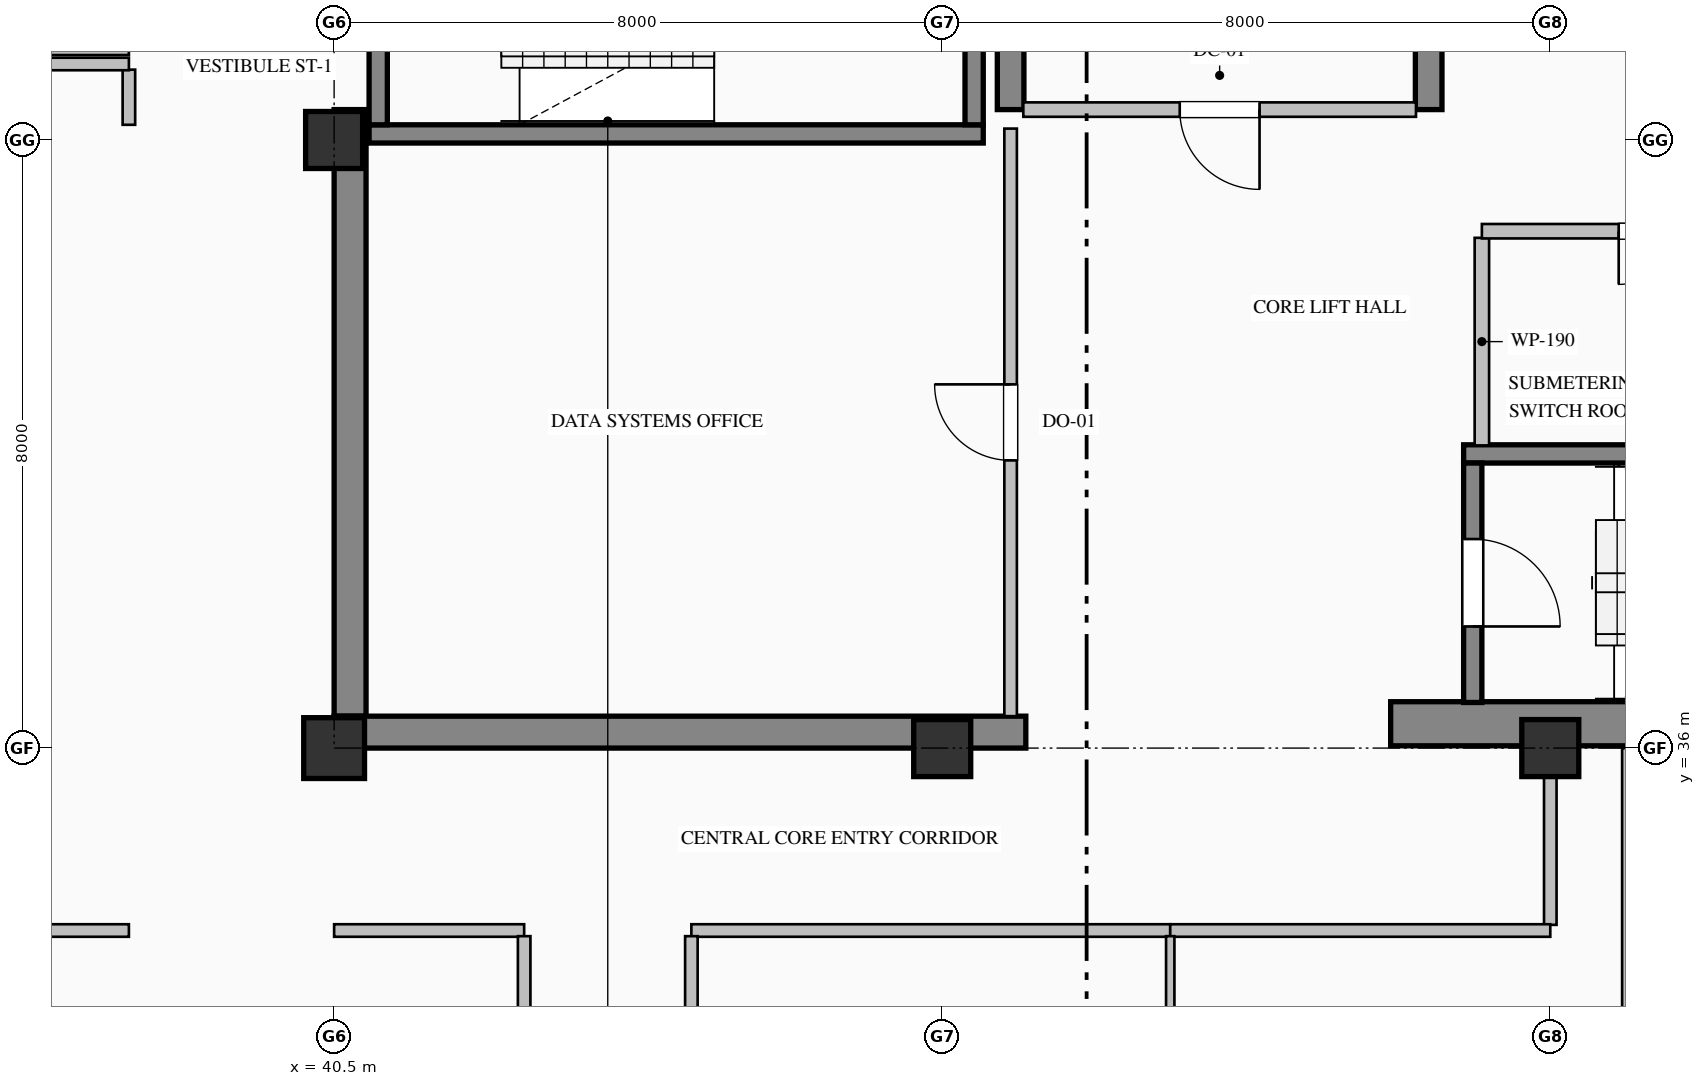
"""IFC4 building model, lengths in metres.
Left out: names, types, materials, properties, quantities, classifications, styles, units other than length and angle.
Written with IfcOpenShell. Run it as: python <this file> out.ifc"""

import sys

from ifc_helpers import new_model, si_unit, direction, frame, frame_2d, origin, origin_2d, place, context, subcontext, project, spatial, rectangle, hollow_rectangle, extrude, element, fill, save


model = new_model("IFC4")
c1 = context("Model", 3, precision=1e-05, world=origin(), true_north=direction((0.0, 1.0)))
c2 = subcontext(c1, "Body", "Model", "MODEL_VIEW")
j1 = project(units=[si_unit("LENGTHUNIT", "METRE"), si_unit("PLANEANGLEUNIT", "RADIAN")], contexts=[c1])
p1 = place(None, origin())
s1 = spatial("IfcSite", under=j1, at=p1, CompositionType="ELEMENT")
p2 = place(p1, origin())
s2 = spatial("IfcBuilding", under=s1, at=p2, CompositionType="ELEMENT")
p3 = place(p2, frame((0.0, 0.0, 327.2)))
s3 = spatial("IfcBuildingStorey", under=s2, at=p3, CompositionType="ELEMENT", Elevation=327.2)
p4 = place(p3, frame((40.71, 36.42, 0.0), z_axis=(0.0, 0.0, 1.0), x_axis=(0.0, 1.0, 0.0)))
e1 = element("IfcWall", 1, at=p4, inside=s3, PredefinedType="SHEAR", context=c2, shape_type="SweptSolid", body=[
    extrude(rectangle(XDim=7.98, YDim=0.42, at=frame_2d((3.99, 0.0))), origin(), (0.0, 0.0, 1.0), 3.785),
])
p5 = place(p3, frame((40.5, 36.21, 0.0), z_axis=(0.0, 0.0, 1.0), x_axis=(1.0, 0.0, 0.0)))
e2 = element("IfcWall", 2, at=p5, inside=s3, PredefinedType="SHEAR", context=c2, shape_type="SweptSolid", body=[
    extrude(rectangle(XDim=9.1, YDim=0.42, at=frame_2d((4.55, 0.0))), origin(), (0.0, 0.0, 1.0), 3.785),
])
p6 = place(p3, frame((54.4, 36.32, 0.0), z_axis=(0.0, 0.0, 1.0), x_axis=(1.0, 0.0, 0.0)))
e3 = element("IfcWall", 3, at=p6, inside=s3, PredefinedType="SHEAR", context=c2, shape_type="SweptSolid", body=[
    extrude(rectangle(XDim=9.6, YDim=0.58, at=frame_2d((4.8, 0.0))), origin(), (0.0, 0.0, 1.0), 4.0),
])
p7 = place(p3, frame((49.4, 44.4, 0.0), z_axis=(0.0, 0.0, 1.0), x_axis=(0.0, 1.0, 0.0)))
e4 = element("IfcWall", 4, at=p7, inside=s3, PredefinedType="SHEAR", context=c2, shape_type="SweptSolid", body=[
    extrude(rectangle(XDim=3.0, YDim=0.35, at=frame_2d((1.5, 0.0))), origin(), (0.0, 0.0, 1.0), 3.785),
])
p8 = place(p3, frame((54.9, 44.4, 0.0), z_axis=(0.0, 0.0, 1.0), x_axis=(0.0, 1.0, 0.0)))
e5 = element("IfcWall", 5, at=p8, inside=s3, PredefinedType="SHEAR", context=c2, shape_type="SweptSolid", body=[
    extrude(rectangle(XDim=7.18, YDim=0.35, at=frame_2d((3.59, 0.0))), origin(), (0.0, 0.0, 1.0), 3.785),
])
p9 = place(p3, frame((40.5, 36.0, 0.0), z_axis=(0.0, 0.0, 1.0), x_axis=(1.0, 0.0, 0.0)))
e6 = element("IfcColumn", 6, at=p9, inside=s3, PredefinedType="COLUMN", context=c2, shape_type="SweptSolid", body=[
    extrude(hollow_rectangle(XDim=0.8, YDim=0.8, WallThickness=0.032, at=origin_2d()), origin(), (0.0, 0.0, 1.0), 4.0),
])
for number, where, z_axis, x_axis in (
    (7, (40.5, 44.0, 0.0), (0.0, 0.0, 1.0), (1.0, 0.0, 0.0)),
    (8, (48.5, 36.0, 0.0), (0.0, 0.0, 1.0), (1.0, 0.0, 0.0)),
    (9, (56.5, 36.0, 0.0), (0.0, 0.0, 1.0), (1.0, 0.0, 0.0)),
):
    element("IfcColumn", number, at=place(p3, frame(where, z_axis=z_axis, x_axis=x_axis)), inside=s3, PredefinedType="COLUMN", context=c2, shape_type="SweptSolid", body=[
        extrude(rectangle(XDim=0.75, YDim=0.75, at=origin_2d()), origin(), (0.0, 0.0, 1.0), 4.0),
    ])
p10 = place(p3, frame((49.04, 44.08, 0.0), z_axis=(0.0, 0.0, 1.0), x_axis=(-1.0, 0.0, 0.0)))
e10 = element("IfcWall", 10, at=p10, inside=s3, PredefinedType="SOLIDWALL", context=c2, shape_type="SweptSolid", body=[
    extrude(rectangle(XDim=8.08, YDim=0.24, at=frame_2d((4.04, 0.0))), origin(), (0.0, 0.0, 1.0), 4.0),
])
p11 = place(p3, frame((41.08, 47.35, 0.0), z_axis=(0.0, 0.0, 1.0), x_axis=(0.0, -1.0, 0.0)))
e11 = element("IfcWall", 11, at=p11, inside=s3, PredefinedType="SOLIDWALL", context=c2, shape_type="SweptSolid", body=[
    extrude(rectangle(XDim=3.15, YDim=0.24, at=frame_2d((1.575, 0.0))), origin(), (0.0, 0.0, 1.0), 4.0),
])
p12 = place(p11, frame((1.0, 0.0, 0.0)))
e12 = element("IfcOpeningElement", 12, at=p12, cuts=e11, PredefinedType="OPENING", context=c2, shape_type="SweptSolid", body=[
    extrude(rectangle(XDim=1.15, YDim=2.2, at=frame_2d((0.575, 1.1))), frame((0.0, 0.13, 0.0), z_axis=(0.0, -1.0, 0.0), x_axis=(1.0, 0.0, 0.0)), (0.0, 0.0, 1.0), 0.26),
])
p13 = place(p3, frame((48.92, 44.2, 0.0), z_axis=(0.0, 0.0, 1.0), x_axis=(0.0, 1.0, 0.0)))
e13 = element("IfcWall", 13, at=p13, inside=s3, PredefinedType="SOLIDWALL", context=c2, shape_type="SweptSolid", body=[
    extrude(rectangle(XDim=3.15, YDim=0.24, at=frame_2d((1.575, 0.0))), origin(), (0.0, 0.0, 1.0), 4.0),
])
p14 = place(p3, frame((55.36, 39.87, 0.0), z_axis=(0.0, 0.0, 1.0), x_axis=(1.0, 0.0, 0.0)))
e14 = element("IfcWall", 14, at=p14, inside=s3, PredefinedType="SOLIDWALL", context=c2, shape_type="SweptSolid", body=[
    extrude(rectangle(XDim=8.08, YDim=0.24, at=frame_2d((4.04, 0.0))), origin(), (0.0, 0.0, 1.0), 4.0),
])
p15 = place(p3, frame((55.48, 39.75, 0.0), z_axis=(0.0, 0.0, 1.0), x_axis=(0.0, -1.0, 0.0)))
e15 = element("IfcWall", 15, at=p15, inside=s3, PredefinedType="SOLIDWALL", context=c2, shape_type="SweptSolid", body=[
    extrude(rectangle(XDim=3.15, YDim=0.24, at=frame_2d((1.575, 0.0))), origin(), (0.0, 0.0, 1.0), 4.0),
])
p16 = place(p15, frame((1.0, 0.0, 0.0)))
e16 = element("IfcOpeningElement", 16, at=p16, cuts=e15, PredefinedType="OPENING", context=c2, shape_type="SweptSolid", body=[
    extrude(rectangle(XDim=1.15, YDim=2.2, at=frame_2d((0.575, 1.1))), frame((0.0, 0.13, 0.0), z_axis=(0.0, -1.0, 0.0), x_axis=(1.0, 0.0, 0.0)), (0.0, 0.0, 1.0), 0.26),
])
p17 = place(p3, frame((37.8, 44.2, 0.0), z_axis=(0.0, 0.0, 1.0), x_axis=(0.0, 1.0, 0.0)))
e17 = element("IfcWall", 17, at=p17, inside=s3, PredefinedType="PARTITIONING", context=c2, shape_type="SweptSolid", body=[
    extrude(rectangle(XDim=0.726, YDim=0.165, at=frame_2d((0.363, 0.0))), origin(), (0.0, 0.0, 1.0), 3.785),
])
p18 = place(p3, frame((54.733, 44.4, 0.0), z_axis=(0.0, 0.0, 1.0), x_axis=(-1.0, 0.0, 0.0)))
e18 = element("IfcWall", 18, at=p18, inside=s3, PredefinedType="PARTITIONING", context=c2, shape_type="SweptSolid", body=[
    extrude(rectangle(XDim=5.166, YDim=0.19, at=frame_2d((2.583, 0.0))), origin(), (0.0, 0.0, 1.0), 3.785),
])
p19 = place(p18, frame((2.058, 0.0, 0.0)))
e19 = element("IfcOpeningElement", 19, at=p19, cuts=e18, PredefinedType="OPENING", context=c2, shape_type="SweptSolid", body=[
    extrude(rectangle(XDim=1.05, YDim=2.15, at=frame_2d((0.525, 1.075))), frame((0.0, 0.105, 0.0), z_axis=(0.0, -1.0, 0.0), x_axis=(1.0, 0.0, 0.0)), (0.0, 0.0, 1.0), 0.21),
])
p20 = place(p3, frame((49.4, 36.42, 0.0), z_axis=(0.0, 0.0, 1.0), x_axis=(0.0, 1.0, 0.0)))
e20 = element("IfcWall", 20, at=p20, inside=s3, PredefinedType="PARTITIONING", context=c2, shape_type="SweptSolid", body=[
    extrude(rectangle(XDim=7.73, YDim=0.165, at=frame_2d((3.865, 0.0))), origin(), (0.0, 0.0, 1.0), 3.027),
])
p21 = place(p20, frame((3.365, 0.0, 0.0)))
e21 = element("IfcOpeningElement", 21, at=p21, cuts=e20, PredefinedType="OPENING", context=c2, shape_type="SweptSolid", body=[
    extrude(rectangle(XDim=1.0, YDim=2.15, at=frame_2d((0.5, 1.075))), frame((0.0, 0.093, 0.0), z_axis=(0.0, -1.0, 0.0), x_axis=(1.0, 0.0, 0.0)), (0.0, 0.0, 1.0), 0.185),
])
p22 = place(p3, frame((55.6, 42.713, 0.0), z_axis=(0.0, 0.0, 1.0), x_axis=(0.0, -1.0, 0.0)))
e22 = element("IfcWall", 22, at=p22, inside=s3, PredefinedType="PARTITIONING", context=c2, shape_type="SweptSolid", body=[
    extrude(rectangle(XDim=2.731, YDim=0.19, at=frame_2d((1.365, 0.0))), origin(), (0.0, 0.0, 1.0), 3.785),
])
p23 = place(p3, frame((60.6, 42.8, 0.0), z_axis=(0.0, 0.0, 1.0), x_axis=(-1.0, 0.0, 0.0)))
e23 = element("IfcWall", 23, at=p23, inside=s3, PredefinedType="PARTITIONING", context=c2, shape_type="SweptSolid", body=[
    extrude(rectangle(XDim=5.0, YDim=0.19, at=frame_2d((2.5, 0.0))), origin(), (0.0, 0.0, 1.0), 3.785),
])
p24 = place(p23, frame((1.8, 0.0, 0.0)))
e24 = element("IfcOpeningElement", 24, at=p24, cuts=e23, PredefinedType="OPENING", context=c2, shape_type="SweptSolid", body=[
    extrude(rectangle(XDim=1.4, YDim=2.25, at=frame_2d((0.7, 1.125))), frame((0.0, 0.105, 0.0), z_axis=(0.0, -1.0, 0.0), x_axis=(1.0, 0.0, 0.0)), (0.0, 0.0, 1.0), 0.21),
])
p25 = place(p3, frame((37.8, 45.2, 0.0), z_axis=(0.0, 0.0, 1.0), x_axis=(-1.0, 0.0, 0.0)))
e25 = element("IfcWall", 25, at=p25, inside=s3, PredefinedType="PARTITIONING", context=c2, shape_type="SweptSolid", body=[
    extrude(rectangle(XDim=13.3, YDim=0.165, at=frame_2d((6.65, 0.0))), origin(), (0.0, 0.0, 1.0), 3.785),
])
p26 = place(p25, frame((6.15, 0.0, 0.0)))
e26 = element("IfcOpeningElement", 26, at=p26, cuts=e25, PredefinedType="OPENING", context=c2, shape_type="SweptSolid", body=[
    extrude(rectangle(XDim=1.0, YDim=2.15, at=frame_2d((0.5, 1.075))), frame((0.0, 0.093, 0.0), z_axis=(0.0, -1.0, 0.0), x_axis=(1.0, 0.0, 0.0)), (0.0, 0.0, 1.0), 0.185),
])
for number, where, z_axis, x_axis in (
    (27, (37.8, 33.6, 0.0), (0.0, 0.0, 1.0), (-1.0, 0.0, 0.0)),
    (28, (35.4, 45.0, 0.0), (0.0, 0.0, 1.0), (1.0, 0.0, 0.0)),
):
    element("IfcWall", number, at=place(p3, frame(where, z_axis=z_axis, x_axis=x_axis)), inside=s3, PredefinedType="PARTITIONING", context=c2, shape_type="SweptSolid", body=[
        extrude(rectangle(XDim=2.4, YDim=0.165, at=frame_2d((1.2, 0.0))), origin(), (0.0, 0.0, 1.0), 3.785),
    ])
p27 = place(p3, frame((51.5, 33.6, 0.0), z_axis=(0.0, 0.0, 1.0), x_axis=(-1.0, 0.0, 0.0)))
e29 = element("IfcWall", 29, at=p27, inside=s3, PredefinedType="PARTITIONING", context=c2, shape_type="SweptSolid", body=[
    extrude(rectangle(XDim=6.3, YDim=0.165, at=frame_2d((3.15, 0.0))), origin(), (0.0, 0.0, 1.0), 3.785),
])
p28 = place(p3, frame((56.5, 36.0, 0.0), z_axis=(0.0, 0.0, 1.0), x_axis=(0.0, -1.0, 0.0)))
e30 = element("IfcWall", 30, at=p28, inside=s3, PredefinedType="PARTITIONING", context=c2, shape_type="SweptSolid", body=[
    extrude(rectangle(XDim=2.325, YDim=0.165, at=frame_2d((1.163, 0.0))), origin(), (0.0, 0.0, 1.0), 3.177),
])
p29 = place(p3, frame((56.5, 33.6, 0.0), z_axis=(0.0, 0.0, 1.0), x_axis=(-1.0, 0.0, 0.0)))
e31 = element("IfcWall", 31, at=p29, inside=s3, PredefinedType="PARTITIONING", context=c2, shape_type="SweptSolid", body=[
    extrude(rectangle(XDim=5.0, YDim=0.165, at=frame_2d((2.5, 0.0))), origin(), (0.0, 0.0, 1.0), 3.785),
])
p30 = place(p3, frame((43.0, 33.6, 0.0), z_axis=(0.0, 0.0, 1.0), x_axis=(-1.0, 0.0, 0.0)))
e32 = element("IfcWall", 32, at=p30, inside=s3, PredefinedType="PARTITIONING", context=c2, shape_type="SweptSolid", body=[
    extrude(rectangle(XDim=2.5, YDim=0.165, at=frame_2d((1.25, 0.0))), origin(), (0.0, 0.0, 1.0), 3.785),
])
p31 = place(p3, frame((45.2, 33.525, 0.0), z_axis=(0.0, 0.0, 1.0), x_axis=(0.0, -1.0, 0.0)))
e33 = element("IfcWall", 33, at=p31, inside=s3, PredefinedType="PARTITIONING", context=c2, shape_type="SweptSolid", body=[
    extrude(rectangle(XDim=8.451, YDim=0.165, at=frame_2d((4.226, 0.0))), origin(), (0.0, 0.0, 1.0), 3.785),
])
p32 = place(p31, frame((3.726, 0.0, 0.0)))
e34 = element("IfcOpeningElement", 34, at=p32, cuts=e33, PredefinedType="OPENING", context=c2, shape_type="SweptSolid", body=[
    extrude(rectangle(XDim=1.0, YDim=2.15, at=frame_2d((0.5, 1.075))), frame((0.0, 0.093, 0.0), z_axis=(0.0, -1.0, 0.0), x_axis=(1.0, 0.0, 0.0)), (0.0, 0.0, 1.0), 0.185),
])
p33 = place(p3, frame((43.0, 22.875, 0.0), z_axis=(0.0, 0.0, 1.0), x_axis=(0.0, 1.0, 0.0)))
e35 = element("IfcWall", 35, at=p33, inside=s3, PredefinedType="PARTITIONING", context=c2, shape_type="SweptSolid", body=[
    extrude(rectangle(XDim=10.651, YDim=0.165, at=frame_2d((5.325, 0.0))), origin(), (0.0, 0.0, 1.0), 3.785),
])
p34 = place(p33, frame((4.825, 0.0, 0.0)))
e36 = element("IfcOpeningElement", 36, at=p34, cuts=e35, PredefinedType="OPENING", context=c2, shape_type="SweptSolid", body=[
    extrude(rectangle(XDim=1.0, YDim=2.15, at=frame_2d((0.5, 1.075))), frame((0.0, 0.093, 0.0), z_axis=(0.0, -1.0, 0.0), x_axis=(1.0, 0.0, 0.0)), (0.0, 0.0, 1.0), 0.185),
])
p35 = place(p3, frame((51.5, 33.525, 0.0), z_axis=(0.0, 0.0, 1.0), x_axis=(0.0, -1.0, 0.0)))
e37 = element("IfcWall", 37, at=p35, inside=s3, PredefinedType="MOVABLE", context=c2, shape_type="SweptSolid", body=[
    extrude(rectangle(XDim=8.451, YDim=0.11, at=frame_2d((4.226, 0.0))), origin(), (0.0, 0.0, 1.0), 3.785),
])
p36 = place(p3, frame((57.5, 36.0, 0.0), z_axis=(0.0, 0.0, 1.0), x_axis=(0.0, -1.0, 0.0)))
e38 = element("IfcWall", 38, at=p36, inside=s3, PredefinedType="MOVABLE", context=c2, shape_type="SweptSolid", body=[
    extrude(rectangle(XDim=10.926, YDim=0.11, at=frame_2d((5.463, 0.0))), origin(), (0.0, 0.0, 1.0), 3.785),
])
p37 = place(p16, origin())
e39 = element("IfcDoor", 39, at=p37, inside=s3, OperationType="SINGLE_SWING_RIGHT", PredefinedType="DOOR", context=c2, shape_type="SweptSolid", body=[
    extrude(rectangle(XDim=1.15, YDim=2.2, at=frame_2d((0.575, 1.1))), frame((0.0, 0.025, 0.0), z_axis=(0.0, -1.0, 0.0), x_axis=(1.0, 0.0, 0.0)), (0.0, 0.0, 1.0), 0.05),
])
fill(e16, e39)
p38 = place(p19, origin())
e40 = element("IfcDoor", 40, at=p38, inside=s3, OperationType="SINGLE_SWING_LEFT", PredefinedType="DOOR", context=c2, shape_type="SweptSolid", body=[
    extrude(rectangle(XDim=1.05, YDim=2.15, at=frame_2d((0.525, 1.075))), frame((0.0, 0.025, 0.0), z_axis=(0.0, -1.0, 0.0), x_axis=(1.0, 0.0, 0.0)), (0.0, 0.0, 1.0), 0.05),
])
fill(e19, e40)
p39 = place(p21, origin())
e41 = element("IfcDoor", 41, at=p39, inside=s3, OperationType="SINGLE_SWING_RIGHT", PredefinedType="DOOR", context=c2, shape_type="SweptSolid", body=[
    extrude(rectangle(XDim=1.0, YDim=2.15, at=frame_2d((0.5, 1.075))), frame((0.0, 0.025, 0.0), z_axis=(0.0, -1.0, 0.0), x_axis=(1.0, 0.0, 0.0)), (0.0, 0.0, 1.0), 0.05),
])
fill(e21, e41)
p40 = place(p24, origin())
e42 = element("IfcDoor", 42, at=p40, inside=s3, OperationType="DOUBLE_DOOR_SINGLE_SWING", PredefinedType="DOOR", context=c2, shape_type="SweptSolid", body=[
    extrude(rectangle(XDim=1.4, YDim=2.25, at=frame_2d((0.7, 1.125))), frame((0.0, 0.025, 0.0), z_axis=(0.0, -1.0, 0.0), x_axis=(1.0, 0.0, 0.0)), (0.0, 0.0, 1.0), 0.05),
])
fill(e24, e42)
save(model, sys.argv[1])
